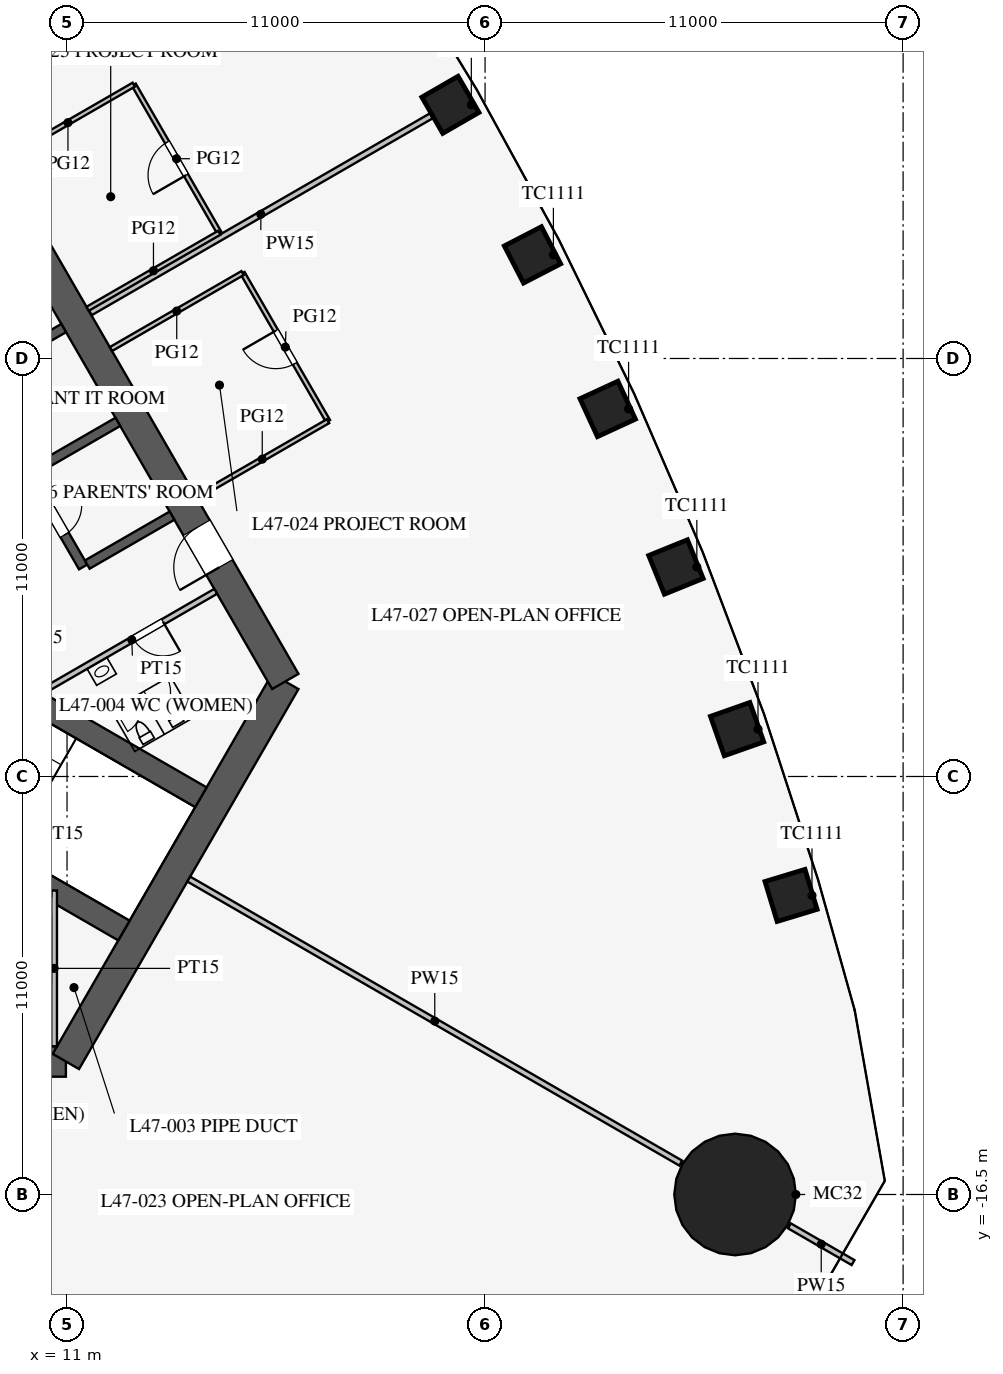
"""IFC4 building model, lengths in metres.
Left out: names, types, materials, properties, quantities, classifications, styles, units other than length and angle.
Written with IfcOpenShell. Run it as: python <this file> out.ifc"""

import sys

from ifc_helpers import new_model, si_unit, direction, frame, frame_2d, origin, origin_2d, place, context, subcontext, project, spatial, rectangle, circle, extrude, element, fill, save


model = new_model("IFC4")
c1 = context("Model", 3, precision=1e-05, world=origin(), true_north=direction((0.0, 1.0)))
c2 = subcontext(c1, "Body", "Model", "MODEL_VIEW")
j1 = project(units=[si_unit("LENGTHUNIT", "METRE"), si_unit("PLANEANGLEUNIT", "RADIAN")], contexts=[c1])
p1 = place(None, origin())
s1 = spatial("IfcSite", under=j1, at=p1, CompositionType="ELEMENT")
p2 = place(p1, origin())
s2 = spatial("IfcBuilding", under=s1, at=p2, CompositionType="ELEMENT")
p3 = place(p2, frame((0.0, 0.0, 206.5)))
s3 = spatial("IfcBuildingStorey", under=s2, at=p3, CompositionType="ELEMENT", Elevation=206.5)
for number, where, z_axis, x_axis in (
    (1, (30.052, -8.63, 0.0), (0.0, 0.0, 1.0), (-0.29, 0.957, 0.0)),
    (2, (28.632, -4.254, 0.0), (0.0, 0.0, 1.0), (-0.332, 0.943, 0.0)),
    (3, (27.022, 0.013, 0.0), (0.0, 0.0, 1.0), (-0.376, 0.927, 0.0)),
    (4, (25.227, 4.172, 0.0), (0.0, 0.0, 1.0), (-0.418, 0.908, 0.0)),
    (5, (23.248, 8.226, 0.0), (0.0, 0.0, 1.0), (-0.46, 0.888, 0.0)),
    (6, (21.088, 12.175, 0.0), (0.0, 0.0, 1.0), (-0.5, 0.866, 0.0)),
):
    element("IfcColumn", number, at=place(p3, frame(where, z_axis=z_axis, x_axis=x_axis)), inside=s3, PredefinedType="COLUMN", context=c2, shape_type="SweptSolid", body=[
        extrude(rectangle(XDim=1.1, YDim=1.1, at=origin_2d()), origin(), (0.0, 0.0, 1.0), 4.2),
    ])
p4 = place(p3, frame((28.579, -16.5, 0.0), z_axis=(0.0, 0.0, 1.0), x_axis=(1.0, 0.0, 0.0)))
e7 = element("IfcColumn", 7, at=p4, inside=s3, PredefinedType="COLUMN", context=c2, shape_type="SweptSolid", body=[
    extrude(circle(Radius=1.6, at=origin_2d()), origin(), (0.0, 0.0, 1.0), 4.2),
])
p5 = place(p3, frame((-10.97, -13.0, 0.0), z_axis=(0.0, 0.0, 1.0), x_axis=(1.0, 0.0, 0.0)))
e8 = element("IfcWall", 8, at=p5, inside=s3, PredefinedType="SHEAR", context=c2, shape_type="SweptSolid", body=[
    extrude(rectangle(XDim=21.939, YDim=0.8, at=frame_2d((10.97, 0.0))), origin(), (0.0, 0.0, 1.0), 4.2),
])
p6 = place(p5, frame((17.27, 0.0, 0.0)))
e9 = element("IfcOpeningElement", 9, at=p6, cuts=e8, PredefinedType="OPENING", context=c2, shape_type="SweptSolid", body=[
    extrude(rectangle(XDim=1.2, YDim=2.1, at=frame_2d((0.6, 1.05))), frame((0.0, 0.41, 0.0), z_axis=(0.0, -1.0, 0.0), x_axis=(1.0, 0.0, 0.0)), (0.0, 0.0, 1.0), 0.82),
])
p7 = place(p5, frame((3.47, 0.0, 0.0)))
e10 = element("IfcOpeningElement", 10, at=p7, cuts=e8, PredefinedType="OPENING", context=c2, shape_type="SweptSolid", body=[
    extrude(rectangle(XDim=1.2, YDim=2.1, at=frame_2d((0.6, 1.05))), frame((0.0, 0.41, 0.0), z_axis=(0.0, -1.0, 0.0), x_axis=(1.0, 0.0, 0.0)), (0.0, 0.0, 1.0), 0.82),
])
p8 = place(p3, frame((10.97, -13.0, 0.0), z_axis=(0.0, 0.0, 1.0), x_axis=(0.499995765644, 0.866027848477, 0.0)))
e11 = element("IfcWall", 11, at=p8, inside=s3, PredefinedType="SHEAR", context=c2, shape_type="SweptSolid", body=[
    extrude(rectangle(XDim=11.547, YDim=0.8, at=frame_2d((5.773, 0.0))), origin(), (0.0, 0.0, 1.0), 4.2),
])
p9 = place(p3, frame((16.743, -3.0, 0.0), z_axis=(0.0, 0.0, 1.0), x_axis=(-0.500002442456, 0.866023993627, 0.0)))
e12 = element("IfcWall", 12, at=p9, inside=s3, PredefinedType="SHEAR", context=c2, shape_type="SweptSolid", body=[
    extrude(rectangle(XDim=21.939, YDim=0.8, at=frame_2d((10.97, 0.0))), origin(), (0.0, 0.0, 1.0), 4.2),
])
p10 = place(p9, frame((17.27, 0.0, 0.0)))
e13 = element("IfcOpeningElement", 13, at=p10, cuts=e12, PredefinedType="OPENING", context=c2, shape_type="SweptSolid", body=[
    extrude(rectangle(XDim=1.2, YDim=2.1, at=frame_2d((0.6, 1.05))), frame((0.0, 0.41, 0.0), z_axis=(0.0, -1.0, 0.0), x_axis=(1.0, 0.0, 0.0)), (0.0, 0.0, 1.0), 0.82),
])
p11 = place(p9, frame((3.47, 0.0, 0.0)))
e14 = element("IfcOpeningElement", 14, at=p11, cuts=e12, PredefinedType="OPENING", context=c2, shape_type="SweptSolid", body=[
    extrude(rectangle(XDim=1.2, YDim=2.1, at=frame_2d((0.6, 1.05))), frame((0.0, 0.41, 0.0), z_axis=(0.0, -1.0, 0.0), x_axis=(1.0, 0.0, 0.0)), (0.0, 0.0, 1.0), 0.82),
])
p12 = place(p3, frame((11.424, 0.014, 0.0), z_axis=(0.0, 0.0, 1.0), x_axis=(-0.500001763848, 0.866024385424, 0.0)))
e15 = element("IfcWall", 15, at=p12, inside=s3, PredefinedType="SHEAR", context=c2, shape_type="SweptSolid", body=[
    extrude(rectangle(XDim=11.4, YDim=0.25, at=frame_2d((5.7, 0.0))), origin(), (0.0, 0.0, 1.0), 4.2),
])
p13 = place(p12, frame((0.975, 0.0, 0.0)))
e16 = element("IfcOpeningElement", 16, at=p13, cuts=e15, PredefinedType="OPENING", context=c2, shape_type="SweptSolid", body=[
    extrude(rectangle(XDim=0.9, YDim=2.1, at=frame_2d((0.45, 1.05))), frame((0.0, 0.135, 0.0), z_axis=(0.0, -1.0, 0.0), x_axis=(1.0, 0.0, 0.0)), (0.0, 0.0, 1.0), 0.27),
])
p14 = place(p12, frame((3.825, 0.0, 0.0)))
e17 = element("IfcOpeningElement", 17, at=p14, cuts=e15, PredefinedType="OPENING", context=c2, shape_type="SweptSolid", body=[
    extrude(rectangle(XDim=0.9, YDim=2.1, at=frame_2d((0.45, 1.05))), frame((0.0, 0.135, 0.0), z_axis=(0.0, -1.0, 0.0), x_axis=(1.0, 0.0, 0.0)), (0.0, 0.0, 1.0), 0.27),
])
p15 = place(p12, frame((6.675, 0.0, 0.0)))
e18 = element("IfcOpeningElement", 18, at=p15, cuts=e15, PredefinedType="OPENING", context=c2, shape_type="SweptSolid", body=[
    extrude(rectangle(XDim=0.9, YDim=2.1, at=frame_2d((0.45, 1.05))), frame((0.0, 0.135, 0.0), z_axis=(0.0, -1.0, 0.0), x_axis=(1.0, 0.0, 0.0)), (0.0, 0.0, 1.0), 0.27),
])
p16 = place(p12, frame((9.525, 0.0, 0.0)))
e19 = element("IfcOpeningElement", 19, at=p16, cuts=e15, PredefinedType="OPENING", context=c2, shape_type="SweptSolid", body=[
    extrude(rectangle(XDim=0.9, YDim=2.1, at=frame_2d((0.45, 1.05))), frame((0.0, 0.135, 0.0), z_axis=(0.0, -1.0, 0.0), x_axis=(1.0, 0.0, 0.0)), (0.0, 0.0, 1.0), 0.27),
])
for number, where, z_axis, x_axis in (
    (20, (11.532, 0.076, 0.0), (0.0, 0.0, 1.0), (0.866, 0.5, 0.0)),
    (21, (10.107, 2.544, 0.0), (0.0, 0.0, 1.0), (0.866, 0.5, 0.0)),
    (22, (8.682, 5.012, 0.0), (0.0, 0.0, 1.0), (0.866, 0.5, 0.0)),
):
    element("IfcWall", number, at=place(p3, frame(where, z_axis=z_axis, x_axis=x_axis)), inside=s3, PredefinedType="SHEAR", context=c2, shape_type="SweptSolid", body=[
        extrude(rectangle(XDim=2.575, YDim=0.25, at=frame_2d((1.288, 0.0))), origin(), (0.0, 0.0, 1.0), 4.2),
    ])
for number, where, z_axis, x_axis in (
    (23, (4.638, -5.016, 0.0), (0.0, 0.0, 1.0), (0.866, -0.5, 0.0)),
    (24, (6.663, -1.509, 0.0), (0.0, 0.0, 1.0), (0.866, -0.5, 0.0)),
):
    element("IfcWall", number, at=place(p3, frame(where, z_axis=z_axis, x_axis=x_axis)), inside=s3, PredefinedType="SHEAR", context=c2, shape_type="SweptSolid", body=[
        extrude(rectangle(XDim=9.075, YDim=0.6, at=frame_2d((4.538, 0.0))), origin(), (0.0, 0.0, 1.0), 4.2),
    ])
p17 = place(p3, frame((10.495, -3.178, 0.0), z_axis=(0.0, 0.0, 1.0), x_axis=(0.86602216432, 0.500005610874, 0.0)))
e25 = element("IfcWall", 25, at=p17, inside=s3, PredefinedType="PARTITIONING", context=c2, shape_type="SweptSolid", body=[
    extrude(rectangle(XDim=5.1, YDim=0.15, at=frame_2d((2.55, 0.0))), origin(), (0.0, 0.0, 1.0), 4.0),
])
p18 = place(p17, frame((2.6, 0.0, 0.0)))
e26 = element("IfcOpeningElement", 26, at=p18, cuts=e25, PredefinedType="OPENING", context=c2, shape_type="SweptSolid", body=[
    extrude(rectangle(XDim=0.9, YDim=2.1, at=frame_2d((0.45, 1.05))), frame((0.0, 0.085, 0.0), z_axis=(0.0, -1.0, 0.0), x_axis=(1.0, 0.0, 0.0)), (0.0, 0.0, 1.0), 0.17),
])
p19 = place(p3, frame((10.66, -8.5, 0.0), z_axis=(0.0, 0.0, 1.0), x_axis=(0.0, -1.0, 0.0)))
e27 = element("IfcWall", 27, at=p19, inside=s3, PredefinedType="PARTITIONING", context=c2, shape_type="SweptSolid", body=[
    extrude(rectangle(XDim=4.1, YDim=0.15, at=frame_2d((2.05, 0.0))), origin(), (0.0, 0.0, 1.0), 4.0),
])
p20 = place(p3, frame((14.203, -8.2, 0.0), z_axis=(0.0, 0.0, 1.0), x_axis=(0.866021600284, -0.500006587798, 0.0)))
e28 = element("IfcWall", 28, at=p20, inside=s3, PredefinedType="PARTITIONING", context=c2, shape_type="SweptSolid", body=[
    extrude(rectangle(XDim=14.95, YDim=0.15, at=frame_2d((7.475, 0.0))), origin(), (0.0, 0.0, 1.0), 2.4),
])
p21 = place(p3, frame((30.008, -17.325, 0.0), z_axis=(0.0, 0.0, 1.0), x_axis=(0.866013246922, -0.500021055713, 0.0)))
e29 = element("IfcWall", 29, at=p21, inside=s3, PredefinedType="PARTITIONING", context=c2, shape_type="SweptSolid", body=[
    extrude(rectangle(XDim=1.935, YDim=0.15, at=frame_2d((0.967, 0.0))), origin(), (0.0, 0.0, 1.0), 2.4),
])
p22 = place(p3, frame((11.613, 6.705, 0.0), z_axis=(0.0, 0.0, 1.0), x_axis=(0.86603333284, 0.499986266222, 0.0)))
e30 = element("IfcWall", 30, at=p22, inside=s3, PredefinedType="PARTITIONING", context=c2, shape_type="SweptSolid", body=[
    extrude(rectangle(XDim=10.361, YDim=0.15, at=frame_2d((5.18, 0.0))), origin(), (0.0, 0.0, 1.0), 3.3),
])
p23 = place(p3, frame((15.006, 8.808, 0.0), z_axis=(0.0, 0.0, 1.0), x_axis=(-0.500013631625, 0.866017533419, 0.0)))
e31 = element("IfcWall", 31, at=p23, inside=s3, PredefinedType="PARTITIONING", context=c2, shape_type="SweptSolid", body=[
    extrude(rectangle(XDim=4.5, YDim=0.12, at=frame_2d((2.25, 0.0))), origin(), (0.0, 0.0, 1.0), 2.9),
])
p24 = place(p23, frame((1.75, 0.0, 0.15)))
e32 = element("IfcOpeningElement", 32, at=p24, cuts=e31, PredefinedType="OPENING", context=c2, shape_type="SweptSolid", body=[
    extrude(rectangle(XDim=1.0, YDim=2.1, at=frame_2d((0.5, 1.05))), frame((0.0, 0.07, 0.0), z_axis=(0.0, -1.0, 0.0), x_axis=(1.0, 0.0, 0.0)), (0.0, 0.0, 1.0), 0.14),
])
p25 = place(p3, frame((17.869, 3.85, 0.0), z_axis=(0.0, 0.0, 1.0), x_axis=(-0.500013631625, 0.866017533419, 0.0)))
e33 = element("IfcWall", 33, at=p25, inside=s3, PredefinedType="PARTITIONING", context=c2, shape_type="SweptSolid", body=[
    extrude(rectangle(XDim=4.5, YDim=0.12, at=frame_2d((2.25, 0.0))), origin(), (0.0, 0.0, 1.0), 2.9),
])
p26 = place(p25, frame((1.75, 0.0, 0.15)))
e34 = element("IfcOpeningElement", 34, at=p26, cuts=e33, PredefinedType="OPENING", context=c2, shape_type="SweptSolid", body=[
    extrude(rectangle(XDim=1.0, YDim=2.1, at=frame_2d((0.5, 1.05))), frame((0.0, 0.07, 0.0), z_axis=(0.0, -1.0, 0.0), x_axis=(1.0, 0.0, 0.0)), (0.0, 0.0, 1.0), 0.14),
])
for number, where, z_axis, x_axis in (
    (35, (11.542, 6.808, 0.0), (0.0, 0.0, 1.0), (0.866, 0.5, 0.0)),
    (36, (9.292, 10.705, 0.0), (0.0, 0.0, 1.0), (0.866, 0.5, 0.0)),
    (37, (12.155, 5.747, 0.0), (0.0, 0.0, 1.0), (0.866, 0.5, 0.0)),
    (38, (14.405, 1.85, 0.0), (0.0, 0.0, 1.0), (0.866, 0.5, 0.0)),
):
    element("IfcWall", number, at=place(p3, frame(where, z_axis=z_axis, x_axis=x_axis)), inside=s3, PredefinedType="PARTITIONING", context=c2, shape_type="SweptSolid", body=[
        extrude(rectangle(XDim=4.0, YDim=0.12, at=frame_2d((2.0, 0.0))), origin(), (0.0, 0.0, 1.0), 2.9),
    ])
p27 = place(p18, frame((0.9, 0.0, 0.0), z_axis=(0.0, 0.0, 1.0), x_axis=(-1.0, 0.0, 0.0)))
e39 = element("IfcDoor", 39, at=p27, inside=s3, OperationType="SINGLE_SWING_LEFT", PredefinedType="DOOR", context=c2, shape_type="SweptSolid", body=[
    extrude(rectangle(XDim=0.9, YDim=2.1, at=frame_2d((0.45, 1.05))), frame((0.0, 0.025, 0.0), z_axis=(0.0, -1.0, 0.0), x_axis=(1.0, 0.0, 0.0)), (0.0, 0.0, 1.0), 0.05),
])
fill(e26, e39)
p28 = place(p11, origin())
e40 = element("IfcDoor", 40, at=p28, inside=s3, OperationType="SINGLE_SWING_LEFT", PredefinedType="DOOR", context=c2, shape_type="SweptSolid", body=[
    extrude(rectangle(XDim=1.2, YDim=2.1, at=frame_2d((0.6, 1.05))), frame((0.0, 0.025, 0.0), z_axis=(0.0, -1.0, 0.0), x_axis=(1.0, 0.0, 0.0)), (0.0, 0.0, 1.0), 0.05),
])
fill(e14, e40)
p29 = place(p13, frame((0.9, 0.0, 0.0), z_axis=(0.0, 0.0, 1.0), x_axis=(-1.0, 0.0, 0.0)))
e41 = element("IfcDoor", 41, at=p29, inside=s3, OperationType="SINGLE_SWING_LEFT", PredefinedType="DOOR", context=c2, shape_type="SweptSolid", body=[
    extrude(rectangle(XDim=0.9, YDim=2.1, at=frame_2d((0.45, 1.05))), frame((0.0, 0.025, 0.0), z_axis=(0.0, -1.0, 0.0), x_axis=(1.0, 0.0, 0.0)), (0.0, 0.0, 1.0), 0.05),
])
fill(e16, e41)
p30 = place(p26, origin())
e42 = element("IfcDoor", 42, at=p30, inside=s3, OperationType="SINGLE_SWING_RIGHT", PredefinedType="DOOR", context=c2, shape_type="SweptSolid", body=[
    extrude(rectangle(XDim=1.0, YDim=2.1, at=frame_2d((0.5, 1.05))), frame((0.0, 0.025, 0.0), z_axis=(0.0, -1.0, 0.0), x_axis=(1.0, 0.0, 0.0)), (0.0, 0.0, 1.0), 0.05),
])
fill(e34, e42)
p31 = place(p24, origin())
e43 = element("IfcDoor", 43, at=p31, inside=s3, OperationType="SINGLE_SWING_LEFT", PredefinedType="DOOR", context=c2, shape_type="SweptSolid", body=[
    extrude(rectangle(XDim=1.0, YDim=2.1, at=frame_2d((0.5, 1.05))), frame((0.0, 0.025, 0.0), z_axis=(0.0, -1.0, 0.0), x_axis=(1.0, 0.0, 0.0)), (0.0, 0.0, 1.0), 0.05),
])
fill(e32, e43)
save(model, sys.argv[1])
